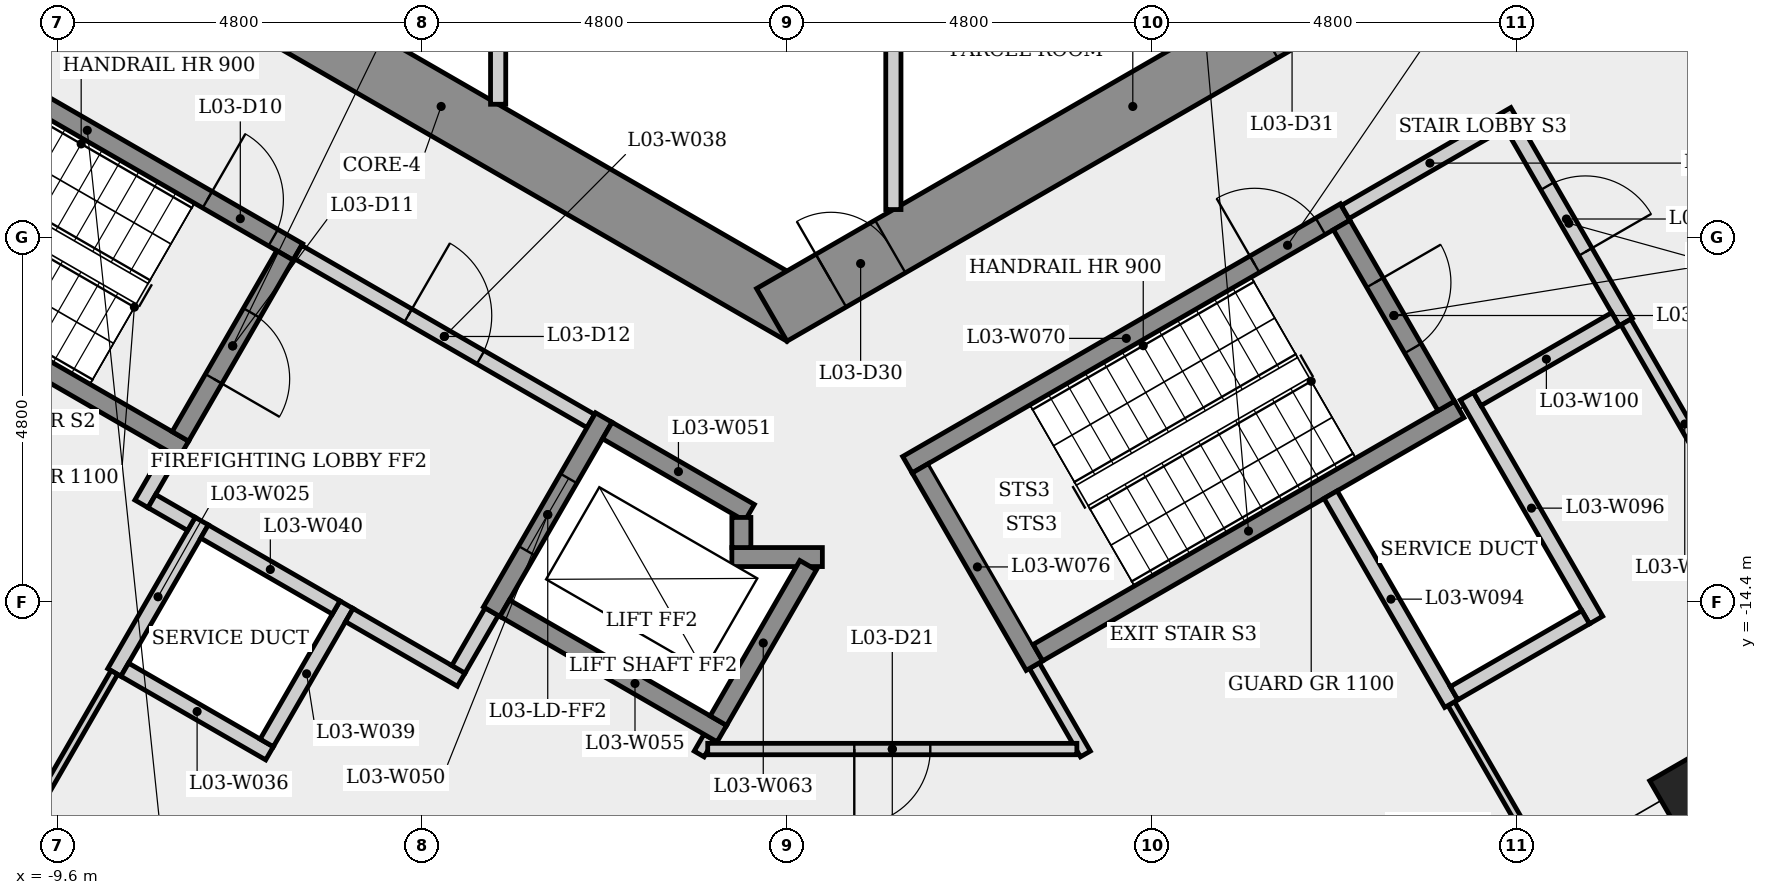
"""IFC4 building model, lengths in metres.
Left out: names, types, materials, properties, quantities, classifications, styles, units other than length and angle.
Written with IfcOpenShell. Run it as: python <this file> out.ifc"""

import sys

from ifc_helpers import new_model, si_unit, direction, frame, frame_2d, origin, origin_2d, place, context, subcontext, project, spatial, rectangle, extrude, element, fill, save


model = new_model("IFC4")
c1 = context("Model", 3, precision=1e-05, world=origin(), true_north=direction((0.0, 1.0)))
c2 = subcontext(c1, "Body", "Model", "MODEL_VIEW")
j1 = project(units=[si_unit("LENGTHUNIT", "METRE"), si_unit("PLANEANGLEUNIT", "RADIAN")], contexts=[c1])
p1 = place(None, origin())
s1 = spatial("IfcSite", under=j1, at=p1, CompositionType="ELEMENT")
p2 = place(p1, origin())
s2 = spatial("IfcBuilding", under=s1, at=p2, CompositionType="ELEMENT")
p3 = place(p2, frame((0.0, 0.0, 16.0)))
s3 = spatial("IfcBuildingStorey", under=s2, at=p3, CompositionType="ELEMENT", Elevation=16.0)
p4 = place(p3, frame((-9.3, -5.138, 0.0), z_axis=(0.0, 0.0, 1.0), x_axis=(0.866023993627, -0.500002442456, 0.0)))
e1 = element("IfcWall", 1, at=p4, inside=s3, PredefinedType="SHEAR", context=c2, shape_type="SweptSolid", body=[
    extrude(rectangle(XDim=10.97, YDim=0.8, at=frame_2d((5.485, 0.0))), origin(), (0.0, 0.0, 1.0), 4.5),
])
p5 = place(p4, frame((0.78, 0.0, 0.0)))
e2 = element("IfcOpeningElement", 2, at=p5, cuts=e1, PredefinedType="OPENING", context=c2, shape_type="SweptSolid", body=[
    extrude(rectangle(XDim=0.9, YDim=2.1, at=frame_2d((0.45, 1.05))), frame((0.0, 0.41, 0.0), z_axis=(0.0, -1.0, 0.0), x_axis=(1.0, 0.0, 0.0)), (0.0, 0.0, 1.0), 0.82),
])
p6 = place(p3, frame((-0.2, -10.623, 0.0), z_axis=(0.0, 0.0, 1.0), x_axis=(0.866023993627, 0.500002442456, 0.0)))
e3 = element("IfcWall", 3, at=p6, inside=s3, PredefinedType="SHEAR", context=c2, shape_type="SweptSolid", body=[
    extrude(rectangle(XDim=10.97, YDim=0.8, at=frame_2d((5.485, 0.0))), origin(), (0.0, 0.0, 1.0), 4.5),
])
p7 = place(p6, frame((0.9, 0.0, 0.0)))
e4 = element("IfcOpeningElement", 4, at=p7, cuts=e3, PredefinedType="OPENING", context=c2, shape_type="SweptSolid", body=[
    extrude(rectangle(XDim=0.9, YDim=2.1, at=frame_2d((0.45, 1.05))), frame((0.0, 0.41, 0.0), z_axis=(0.0, -1.0, 0.0), x_axis=(1.0, 0.0, 0.0)), (0.0, 0.0, 1.0), 0.82),
])
p8 = place(p6, frame((7.455, 0.0, 0.0)))
e5 = element("IfcOpeningElement", 5, at=p8, cuts=e3, PredefinedType="OPENING", context=c2, shape_type="SweptSolid", body=[
    extrude(rectangle(XDim=0.9, YDim=2.1, at=frame_2d((0.45, 1.05))), frame((0.0, 0.41, 0.0), z_axis=(0.0, -1.0, 0.0), x_axis=(1.0, 0.0, 0.0)), (0.0, 0.0, 1.0), 0.82),
])
p9 = place(p3, frame((12.171, -16.973, 0.0), z_axis=(0.0, 0.0, 1.0), x_axis=(0.5, -0.866025403784, 0.0)))
e6 = element("IfcColumn", 6, at=p9, inside=s3, PredefinedType="COLUMN", context=c2, shape_type="SweptSolid", body=[
    extrude(rectangle(XDim=1.2, YDim=1.2, at=origin_2d()), origin(), (0.0, 0.0, 1.0), 4.5),
])
p10 = place(p3, frame((-11.977, -6.595, 0.0), z_axis=(0.0, 0.0, 1.0), x_axis=(0.866025499775, -0.499999833739, 0.0)))
e7 = element("IfcWall", 7, at=p10, inside=s3, PredefinedType="SHEAR", context=c2, shape_type="SweptSolid", body=[
    extrude(rectangle(XDim=6.4, YDim=0.25, at=frame_2d((3.2, 0.0))), origin(), (0.0, 0.0, 1.0), 4.05),
])
p11 = place(p10, frame((5.025, 0.0, 0.0)))
e8 = element("IfcOpeningElement", 8, at=p11, cuts=e7, PredefinedType="OPENING", context=c2, shape_type="SweptSolid", body=[
    extrude(rectangle(XDim=1.0, YDim=2.1, at=frame_2d((0.5, 1.05))), frame((0.0, 0.135, 0.0), z_axis=(0.0, -1.0, 0.0), x_axis=(1.0, 0.0, 0.0)), (0.0, 0.0, 1.0), 0.27),
])
p12 = place(p3, frame((-8.85, -15.329, 0.0), z_axis=(0.0, 0.0, 1.0), x_axis=(0.500077740698, 0.865980515519, 0.0)))
e9 = element("IfcWall", 9, at=p12, inside=s3, PredefinedType="PLUMBINGWALL", context=c2, shape_type="SweptSolid", body=[
    extrude(rectangle(XDim=2.3, YDim=0.2, at=frame_2d((1.15, 0.0))), origin(), (0.0, 0.0, 1.0), 4.05),
])
p13 = place(p3, frame((-8.85, -15.329, 0.0), z_axis=(0.0, 0.0, 1.0), x_axis=(-0.499991453095, -0.866030338286, 0.0)))
e10 = element("IfcWall", 10, at=p13, inside=s3, PredefinedType="PARTITIONING", context=c2, shape_type="SweptSolid", body=[
    extrude(rectangle(XDim=3.98, YDim=0.1, at=frame_2d((1.99, 0.0))), origin(), (0.0, 0.0, 1.0), 4.05),
])
p14 = place(p3, frame((-8.493, -13.11, 0.0), z_axis=(0.0, 0.0, 1.0), x_axis=(0.500067724834, 0.865986299303, 0.0)))
e11 = element("IfcWall", 11, at=p14, inside=s3, PredefinedType="PARTITIONING", context=c2, shape_type="SweptSolid", body=[
    extrude(rectangle(XDim=0.775, YDim=0.2, at=frame_2d((0.388, 0.0))), origin(), (0.0, 0.0, 1.0), 4.05),
])
p15 = place(p3, frame((-7.935, -12.393, 0.0), z_axis=(0.0, 0.0, 1.0), x_axis=(-0.866025499775, 0.499999833739, 0.0)))
e12 = element("IfcWall", 12, at=p15, inside=s3, PredefinedType="SHEAR", context=c2, shape_type="SweptSolid", body=[
    extrude(rectangle(XDim=6.4, YDim=0.25, at=frame_2d((3.2, 0.0))), origin(), (0.0, 0.0, 1.0), 4.05),
])
p16 = place(p3, frame((-7.836, -13.373, 0.0), z_axis=(0.0, 0.0, 1.0), x_axis=(-0.866232998003, 0.499640263761, 0.0)))
e13 = element("IfcWall", 13, at=p16, inside=s3, PredefinedType="PARTITIONING", context=c2, shape_type="SweptSolid", body=[
    extrude(rectangle(XDim=0.6, YDim=0.2, at=frame_2d((0.3, 0.0))), origin(), (0.0, 0.0, 1.0), 4.05),
])
p17 = place(p3, frame((-6.808, -16.392, 0.0), z_axis=(0.0, 0.0, 1.0), x_axis=(-0.866008176907, 0.50002983664, 0.0)))
e14 = element("IfcWall", 14, at=p17, inside=s3, PredefinedType="PLUMBINGWALL", context=c2, shape_type="SweptSolid", body=[
    extrude(rectangle(XDim=2.2, YDim=0.2, at=frame_2d((1.1, 0.0))), origin(), (0.0, 0.0, 1.0), 4.05),
])
p18 = place(p3, frame((-6.605, -9.841, 0.0), z_axis=(0.0, 0.0, 1.0), x_axis=(-0.499996545922, -0.866027397988, 0.0)))
e15 = element("IfcWall", 15, at=p18, inside=s3, PredefinedType="SHEAR", context=c2, shape_type="SweptSolid", body=[
    extrude(rectangle(XDim=2.75, YDim=0.25, at=frame_2d((1.375, 0.0))), origin(), (0.0, 0.0, 1.0), 4.05),
])
p19 = place(p18, frame((0.875, 0.0, 0.0)))
e16 = element("IfcOpeningElement", 16, at=p19, cuts=e15, PredefinedType="OPENING", context=c2, shape_type="SweptSolid", body=[
    extrude(rectangle(XDim=1.0, YDim=2.1, at=frame_2d((0.5, 1.05))), frame((0.0, 0.135, 0.0), z_axis=(0.0, -1.0, 0.0), x_axis=(1.0, 0.0, 0.0)), (0.0, 0.0, 1.0), 0.27),
])
p20 = place(p3, frame((-6.435, -9.795, 0.0), z_axis=(0.0, 0.0, 1.0), x_axis=(0.866012907634, -0.500021643343, 0.0)))
e17 = element("IfcWall", 17, at=p20, inside=s3, PredefinedType="PARTITIONING", context=c2, shape_type="SweptSolid", body=[
    extrude(rectangle(XDim=4.45, YDim=0.2, at=frame_2d((2.225, 0.0))), origin(), (0.0, 0.0, 1.0), 4.05),
])
p21 = place(p20, frame((1.675, 0.0, 0.0)))
e18 = element("IfcOpeningElement", 18, at=p21, cuts=e17, PredefinedType="OPENING", context=c2, shape_type="SweptSolid", body=[
    extrude(rectangle(XDim=1.1, YDim=2.1, at=frame_2d((0.55, 1.05))), frame((0.0, 0.11, 0.0), z_axis=(0.0, -1.0, 0.0), x_axis=(1.0, 0.0, 0.0)), (0.0, 0.0, 1.0), 0.22),
])
p22 = place(p3, frame((-5.795, -14.437, 0.0), z_axis=(0.0, 0.0, 1.0), x_axis=(-0.500027713859, -0.866009402589, 0.0)))
e19 = element("IfcWall", 19, at=p22, inside=s3, PredefinedType="PLUMBINGWALL", context=c2, shape_type="SweptSolid", body=[
    extrude(rectangle(XDim=2.1, YDim=0.2, at=frame_2d((1.05, 0.0))), origin(), (0.0, 0.0, 1.0), 4.05),
])
p23 = place(p3, frame((-5.931, -14.473, 0.0), z_axis=(0.0, 0.0, 1.0), x_axis=(-0.866041268327, 0.499972520799, 0.0)))
e20 = element("IfcWall", 20, at=p23, inside=s3, PredefinedType="PLUMBINGWALL", context=c2, shape_type="SweptSolid", body=[
    extrude(rectangle(XDim=2.0, YDim=0.2, at=frame_2d((1.0, 0.0))), origin(), (0.0, 0.0, 1.0), 4.05),
])
p24 = place(p3, frame((-4.286, -15.423, 0.0), z_axis=(0.0, 0.0, 1.0), x_axis=(-0.866025371046, 0.500000056704, 0.0)))
e21 = element("IfcWall", 21, at=p24, inside=s3, PredefinedType="PARTITIONING", context=c2, shape_type="SweptSolid", body=[
    extrude(rectangle(XDim=1.7, YDim=0.2, at=frame_2d((0.85, 0.0))), origin(), (0.0, 0.0, 1.0), 4.05),
])
p25 = place(p3, frame((-3.885, -14.529, 0.0), z_axis=(0.0, 0.0, 1.0), x_axis=(-0.499859285417, -0.866106630146, 0.0)))
e22 = element("IfcWall", 22, at=p25, inside=s3, PredefinedType="PARTITIONING", context=c2, shape_type="SweptSolid", body=[
    extrude(rectangle(XDim=0.875, YDim=0.2, at=frame_2d((0.438, 0.0))), origin(), (0.0, 0.0, 1.0), 4.05),
])
p26 = place(p3, frame((-3.8, -5.275, 0.0), z_axis=(0.0, 0.0, 1.0), x_axis=(0.0, -1.0, 0.0)))
e23 = element("IfcWall", 23, at=p26, inside=s3, PredefinedType="PARTITIONING", context=c2, shape_type="SweptSolid", body=[
    extrude(rectangle(XDim=2.577, YDim=0.2, at=frame_2d((1.289, 0.0))), origin(), (0.0, 0.0, 1.0), 4.05),
])
p27 = place(p3, frame((-2.41, -11.974, 0.0), z_axis=(0.0, 0.0, 1.0), x_axis=(-0.500001826776, -0.866024349092, 0.0)))
e24 = element("IfcWall", 24, at=p27, inside=s3, PredefinedType="SHEAR", context=c2, shape_type="SweptSolid", body=[
    extrude(rectangle(XDim=2.95, YDim=0.25, at=frame_2d((1.475, 0.0))), origin(), (0.0, 0.0, 1.0), 4.05),
])
p28 = place(p27, frame((0.925, 0.0, 0.0)))
e25 = element("IfcOpeningElement", 25, at=p28, cuts=e24, PredefinedType="OPENING", context=c2, shape_type="SweptSolid", body=[
    extrude(rectangle(XDim=1.1, YDim=2.1, at=frame_2d((0.55, 1.05))), frame((0.0, 0.135, 0.0), z_axis=(0.0, -1.0, 0.0), x_axis=(1.0, 0.0, 0.0)), (0.0, 0.0, 1.0), 0.27),
])
p29 = place(p3, frame((-2.364, -12.145, 0.0), z_axis=(0.0, 0.0, 1.0), x_axis=(0.86603892542, -0.499976579108, 0.0)))
e26 = element("IfcWall", 26, at=p29, inside=s3, PredefinedType="SHEAR", context=c2, shape_type="SweptSolid", body=[
    extrude(rectangle(XDim=2.162, YDim=0.25, at=frame_2d((1.081, 0.0))), origin(), (0.0, 0.0, 1.0), 4.05),
])
p30 = place(p3, frame((-1.155, -16.401, 0.0), z_axis=(0.0, 0.0, 1.0), x_axis=(0.500134748329, 0.865947592822, 0.0)))
e27 = element("IfcWall", 27, at=p30, inside=s3, PredefinedType="PARTITIONING", context=c2, shape_type="SweptSolid", body=[
    extrude(rectangle(XDim=0.256, YDim=0.15, at=frame_2d((0.128, 0.0))), origin(), (0.0, 0.0, 1.0), 4.05),
])
p31 = place(p3, frame((-0.856, -16.133, 0.0), z_axis=(0.0, 0.0, 1.0), x_axis=(-0.866021716278, 0.500006386895, 0.0)))
e28 = element("IfcWall", 28, at=p31, inside=s3, PredefinedType="SHEAR", context=c2, shape_type="SweptSolid", body=[
    extrude(rectangle(XDim=3.3, YDim=0.25, at=frame_2d((1.65, 0.0))), origin(), (0.0, 0.0, 1.0), 4.05),
])
p32 = place(p3, frame((-0.725, -13.81, 0.0), z_axis=(0.0, 0.0, 1.0), x_axis=(1.0, 0.0, 0.0)))
e29 = element("IfcWall", 29, at=p32, inside=s3, PredefinedType="SHEAR", context=c2, shape_type="SweptSolid", body=[
    extrude(rectangle(XDim=1.191, YDim=0.25, at=frame_2d((0.595, 0.0))), origin(), (0.0, 0.0, 1.0), 4.05),
])
p33 = place(p3, frame((-0.6, -13.289, 0.0), z_axis=(0.0, 0.0, 1.0), x_axis=(0.0, -1.0, 0.0)))
e30 = element("IfcWall", 30, at=p33, inside=s3, PredefinedType="SHEAR", context=c2, shape_type="SweptSolid", body=[
    extrude(rectangle(XDim=0.396, YDim=0.25, at=frame_2d((0.198, 0.0))), origin(), (0.0, 0.0, 1.0), 4.5),
])
p34 = place(p3, frame((0.278, -13.918, 0.0), z_axis=(0.0, 0.0, 1.0), x_axis=(-0.49998806882, -0.866032292145, 0.0)))
e31 = element("IfcWall", 31, at=p34, inside=s3, PredefinedType="SHEAR", context=c2, shape_type="SweptSolid", body=[
    extrude(rectangle(XDim=2.36, YDim=0.25, at=frame_2d((1.18, 0.0))), origin(), (0.0, 0.0, 1.0), 4.5),
])
p35 = place(p3, frame((1.4, -5.275, 0.0), z_axis=(0.0, 0.0, 1.0), x_axis=(0.0, -1.0, 0.0)))
e32 = element("IfcWall", 32, at=p35, inside=s3, PredefinedType="PARTITIONING", context=c2, shape_type="SweptSolid", body=[
    extrude(rectangle(XDim=3.963, YDim=0.2, at=frame_2d((1.981, 0.0))), origin(), (0.0, 0.0, 1.0), 4.05),
])
p36 = place(p3, frame((1.585, -12.595, 0.0), z_axis=(0.0, 0.0, 1.0), x_axis=(0.866036417653, 0.499980922934, 0.0)))
e33 = element("IfcWall", 33, at=p36, inside=s3, PredefinedType="SHEAR", context=c2, shape_type="SweptSolid", body=[
    extrude(rectangle(XDim=6.65, YDim=0.25, at=frame_2d((3.325, 0.0))), origin(), (0.0, 0.0, 1.0), 4.05),
])
p37 = place(p36, frame((5.275, 0.0, 0.0)))
e34 = element("IfcOpeningElement", 34, at=p37, cuts=e33, PredefinedType="OPENING", context=c2, shape_type="SweptSolid", body=[
    extrude(rectangle(XDim=1.0, YDim=2.1, at=frame_2d((0.5, 1.05))), frame((0.0, 0.135, 0.0), z_axis=(0.0, -1.0, 0.0), x_axis=(1.0, 0.0, 0.0)), (0.0, 0.0, 1.0), 0.27),
])
p38 = place(p3, frame((3.256, -15.239, 0.0), z_axis=(0.0, 0.0, 1.0), x_axis=(0.499974444137, -0.866040157966, 0.0)))
e35 = element("IfcWall", 35, at=p38, inside=s3, PredefinedType="PARTITIONING", context=c2, shape_type="SweptSolid", body=[
    extrude(rectangle(XDim=1.342, YDim=0.15, at=frame_2d((0.671, 0.0))), origin(), (0.0, 0.0, 1.0), 4.05),
])
p39 = place(p3, frame((3.256, -15.239, 0.0), z_axis=(0.0, 0.0, 1.0), x_axis=(-0.50002537861, 0.866010750942, 0.0)))
e36 = element("IfcWall", 36, at=p39, inside=s3, PredefinedType="SHEAR", context=c2, shape_type="SweptSolid", body=[
    extrude(rectangle(XDim=3.0, YDim=0.25, at=frame_2d((1.5, 0.0))), origin(), (0.0, 0.0, 1.0), 4.05),
])
p40 = place(p3, frame((3.814, -16.336, 0.0), z_axis=(0.0, 0.0, 1.0), x_axis=(-1.0, 0.0, 0.0)))
e37 = element("IfcWall", 37, at=p40, inside=s3, PredefinedType="PARTITIONING", context=c2, shape_type="SweptSolid", body=[
    extrude(rectangle(XDim=4.857, YDim=0.15, at=frame_2d((2.428, 0.0))), origin(), (0.0, 0.0, 1.0), 4.05),
])
p41 = place(p40, frame((1.928, 0.0, 0.0)))
e38 = element("IfcOpeningElement", 38, at=p41, cuts=e37, PredefinedType="OPENING", context=c2, shape_type="SweptSolid", body=[
    extrude(rectangle(XDim=1.0, YDim=2.1, at=frame_2d((0.5, 1.05))), frame((0.0, 0.085, 0.0), z_axis=(0.0, -1.0, 0.0), x_axis=(1.0, 0.0, 0.0)), (0.0, 0.0, 1.0), 0.17),
])
p42 = place(p3, frame((3.301, -15.068, 0.0), z_axis=(0.0, 0.0, 1.0), x_axis=(0.866035036182, 0.499983315828, 0.0)))
e39 = element("IfcWall", 39, at=p42, inside=s3, PredefinedType="SHEAR", context=c2, shape_type="SweptSolid", body=[
    extrude(rectangle(XDim=6.4, YDim=0.25, at=frame_2d((3.2, 0.0))), origin(), (0.0, 0.0, 1.0), 4.05),
])
p43 = place(p3, frame((7.298, -9.441, 0.0), z_axis=(0.0, 0.0, 1.0), x_axis=(0.500034990121, -0.866005201286, 0.0)))
e40 = element("IfcWall", 40, at=p43, inside=s3, PredefinedType="SHEAR", context=c2, shape_type="SweptSolid", body=[
    extrude(rectangle(XDim=2.75, YDim=0.25, at=frame_2d((1.375, 0.0))), origin(), (0.0, 0.0, 1.0), 4.05),
])
p44 = place(p43, frame((0.875, 0.0, 0.0)))
e41 = element("IfcOpeningElement", 41, at=p44, cuts=e40, PredefinedType="OPENING", context=c2, shape_type="SweptSolid", body=[
    extrude(rectangle(XDim=1.0, YDim=2.1, at=frame_2d((0.5, 1.05))), frame((0.0, 0.135, 0.0), z_axis=(0.0, -1.0, 0.0), x_axis=(1.0, 0.0, 0.0)), (0.0, 0.0, 1.0), 0.27),
])
p45 = place(p3, frame((7.344, -9.27, 0.0), z_axis=(0.0, 0.0, 1.0), x_axis=(0.866005588531, 0.500034319456, 0.0)))
e42 = element("IfcWall", 42, at=p45, inside=s3, PredefinedType="PARTITIONING", context=c2, shape_type="SweptSolid", body=[
    extrude(rectangle(XDim=2.575, YDim=0.2, at=frame_2d((1.288, 0.0))), origin(), (0.0, 0.0, 1.0), 4.05),
])
p46 = place(p3, frame((8.74, -15.738, 0.0), z_axis=(0.0, 0.0, 1.0), x_axis=(0.500026738915, -0.866009965514, 0.0)))
e43 = element("IfcWall", 43, at=p46, inside=s3, PredefinedType="PARTITIONING", context=c2, shape_type="SweptSolid", body=[
    extrude(rectangle(XDim=3.681, YDim=0.1, at=frame_2d((1.84, 0.0))), origin(), (0.0, 0.0, 1.0), 4.05),
])
p47 = place(p3, frame((8.74, -15.739, 0.0), z_axis=(0.0, 0.0, 1.0), x_axis=(-0.500017526161, 0.866015284814, 0.0)))
e44 = element("IfcWall", 44, at=p47, inside=s3, PredefinedType="PLUMBINGWALL", context=c2, shape_type="SweptSolid", body=[
    extrude(rectangle(XDim=3.175, YDim=0.2, at=frame_2d((1.588, 0.0))), origin(), (0.0, 0.0, 1.0), 4.05),
])
p48 = place(p3, frame((8.945, -11.694, 0.0), z_axis=(0.0, 0.0, 1.0), x_axis=(0.500062241894, -0.865989465428, 0.0)))
e45 = element("IfcWall", 45, at=p48, inside=s3, PredefinedType="PLUMBINGWALL", context=c2, shape_type="SweptSolid", body=[
    extrude(rectangle(XDim=3.4, YDim=0.2, at=frame_2d((1.7, 0.0))), origin(), (0.0, 0.0, 1.0), 4.05),
])
p49 = place(p3, frame((9.537, -8.119, 0.0), z_axis=(0.0, 0.0, 1.0), x_axis=(0.499990139034, -0.866031096941, 0.0)))
e46 = element("IfcWall", 46, at=p49, inside=s3, PredefinedType="PARTITIONING", context=c2, shape_type="SweptSolid", body=[
    extrude(rectangle(XDim=3.0, YDim=0.2, at=frame_2d((1.5, 0.0))), origin(), (0.0, 0.0, 1.0), 4.05),
])
p50 = place(p49, frame((0.935, 0.0, 0.0)))
e47 = element("IfcOpeningElement", 47, at=p50, cuts=e46, PredefinedType="OPENING", context=c2, shape_type="SweptSolid", body=[
    extrude(rectangle(XDim=1.0, YDim=2.1, at=frame_2d((0.5, 1.05))), frame((0.0, 0.11, 0.0), z_axis=(0.0, -1.0, 0.0), x_axis=(1.0, 0.0, 0.0)), (0.0, 0.0, 1.0), 0.22),
])
p51 = place(p3, frame((10.509, -14.602, 0.0), z_axis=(0.0, 0.0, 1.0), x_axis=(-0.866010750942, -0.50002537861, 0.0)))
e48 = element("IfcWall", 48, at=p51, inside=s3, PredefinedType="PLUMBINGWALL", context=c2, shape_type="SweptSolid", body=[
    extrude(rectangle(XDim=2.0, YDim=0.2, at=frame_2d((1.0, 0.0))), origin(), (0.0, 0.0, 1.0), 4.05),
])
p52 = place(p3, frame((10.901, -10.681, 0.0), z_axis=(0.0, 0.0, 1.0), x_axis=(-0.866009402589, -0.500027713859, 0.0)))
e49 = element("IfcWall", 49, at=p52, inside=s3, PredefinedType="PARTITIONING", context=c2, shape_type="SweptSolid", body=[
    extrude(rectangle(XDim=2.1, YDim=0.2, at=frame_2d((1.05, 0.0))), origin(), (0.0, 0.0, 1.0), 4.05),
])
p53 = place(p3, frame((12.587, -13.401, 0.0), z_axis=(0.0, 0.0, 1.0), x_axis=(-0.499952049853, 0.866053086045, 0.0)))
e50 = element("IfcWall", 50, at=p53, inside=s3, PredefinedType="PARTITIONING", context=c2, shape_type="SweptSolid", body=[
    extrude(rectangle(XDim=3.099, YDim=0.15, at=frame_2d((1.549, 0.0))), origin(), (0.0, 0.0, 1.0), 4.05),
])
p54 = place(p11, origin())
e51 = element("IfcDoor", 51, at=p54, inside=s3, OperationType="SINGLE_SWING_LEFT", PredefinedType="DOOR", context=c2, shape_type="SweptSolid", body=[
    extrude(rectangle(XDim=1.0, YDim=2.1, at=frame_2d((0.5, 1.05))), frame((0.0, 0.025, 0.0), z_axis=(0.0, -1.0, 0.0), x_axis=(1.0, 0.0, 0.0)), (0.0, 0.0, 1.0), 0.05),
])
fill(e8, e51)
p55 = place(p19, origin())
e52 = element("IfcDoor", 52, at=p55, inside=s3, OperationType="SINGLE_SWING_RIGHT", PredefinedType="DOOR", context=c2, shape_type="SweptSolid", body=[
    extrude(rectangle(XDim=1.0, YDim=2.1, at=frame_2d((0.5, 1.05))), frame((0.0, 0.025, 0.0), z_axis=(0.0, -1.0, 0.0), x_axis=(1.0, 0.0, 0.0)), (0.0, 0.0, 1.0), 0.05),
])
fill(e16, e52)
p56 = place(p21, origin())
e53 = element("IfcDoor", 53, at=p56, inside=s3, OperationType="SINGLE_SWING_LEFT", PredefinedType="DOOR", context=c2, shape_type="SweptSolid", body=[
    extrude(rectangle(XDim=1.1, YDim=2.1, at=frame_2d((0.55, 1.05))), frame((0.0, 0.025, 0.0), z_axis=(0.0, -1.0, 0.0), x_axis=(1.0, 0.0, 0.0)), (0.0, 0.0, 1.0), 0.05),
])
fill(e18, e53)
p57 = place(p28, origin())
e54 = element("IfcDoor", 54, at=p57, inside=s3, OperationType="SLIDING_TO_LEFT", PredefinedType="DOOR", context=c2, shape_type="SweptSolid", body=[
    extrude(rectangle(XDim=1.1, YDim=2.1, at=frame_2d((0.55, 1.05))), frame((0.0, 0.025, 0.0), z_axis=(0.0, -1.0, 0.0), x_axis=(1.0, 0.0, 0.0)), (0.0, 0.0, 1.0), 0.05),
])
fill(e25, e54)
p58 = place(p37, origin())
e55 = element("IfcDoor", 55, at=p58, inside=s3, OperationType="SINGLE_SWING_LEFT", PredefinedType="DOOR", context=c2, shape_type="SweptSolid", body=[
    extrude(rectangle(XDim=1.0, YDim=2.1, at=frame_2d((0.5, 1.05))), frame((0.0, 0.025, 0.0), z_axis=(0.0, -1.0, 0.0), x_axis=(1.0, 0.0, 0.0)), (0.0, 0.0, 1.0), 0.05),
])
fill(e34, e55)
p59 = place(p50, origin())
e56 = element("IfcDoor", 56, at=p59, inside=s3, OperationType="SINGLE_SWING_RIGHT", PredefinedType="DOOR", context=c2, shape_type="SweptSolid", body=[
    extrude(rectangle(XDim=1.0, YDim=2.1, at=frame_2d((0.5, 1.05))), frame((0.0, 0.025, 0.0), z_axis=(0.0, -1.0, 0.0), x_axis=(1.0, 0.0, 0.0)), (0.0, 0.0, 1.0), 0.05),
])
fill(e47, e56)
p60 = place(p44, origin())
e57 = element("IfcDoor", 57, at=p60, inside=s3, OperationType="SINGLE_SWING_LEFT", PredefinedType="DOOR", context=c2, shape_type="SweptSolid", body=[
    extrude(rectangle(XDim=1.0, YDim=2.1, at=frame_2d((0.5, 1.05))), frame((0.0, 0.025, 0.0), z_axis=(0.0, -1.0, 0.0), x_axis=(1.0, 0.0, 0.0)), (0.0, 0.0, 1.0), 0.05),
])
fill(e41, e57)
p61 = place(p41, origin())
e58 = element("IfcDoor", 58, at=p61, inside=s3, OperationType="SINGLE_SWING_RIGHT", PredefinedType="DOOR", context=c2, shape_type="SweptSolid", body=[
    extrude(rectangle(XDim=1.0, YDim=2.1, at=frame_2d((0.5, 1.05))), frame((0.0, 0.025, 0.0), z_axis=(0.0, -1.0, 0.0), x_axis=(1.0, 0.0, 0.0)), (0.0, 0.0, 1.0), 0.05),
])
fill(e38, e58)
p62 = place(p7, origin())
e59 = element("IfcDoor", 59, at=p62, inside=s3, OperationType="SINGLE_SWING_LEFT", PredefinedType="DOOR", context=c2, shape_type="SweptSolid", body=[
    extrude(rectangle(XDim=0.9, YDim=2.1, at=frame_2d((0.45, 1.05))), frame((0.0, 0.025, 0.0), z_axis=(0.0, -1.0, 0.0), x_axis=(1.0, 0.0, 0.0)), (0.0, 0.0, 1.0), 0.05),
])
fill(e4, e59)
save(model, sys.argv[1])
